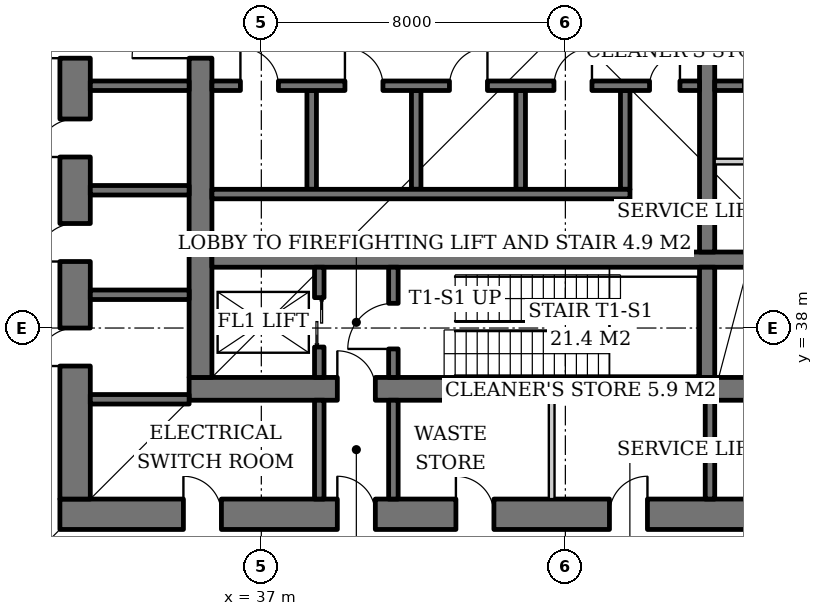
"""IFC4 building model, lengths in metres.
Left out: names, types, materials, properties, quantities, classifications, styles, units other than length and angle.
Written with IfcOpenShell. Run it as: python <this file> out.ifc"""

import sys

from ifc_helpers import new_model, si_unit, direction, frame, frame_2d, origin, place, context, subcontext, project, spatial, rectangle, extrude, element, fill, save


model = new_model("IFC4")
c1 = context("Model", 3, precision=1e-05, world=origin(), true_north=direction((0.0, 1.0)))
c2 = subcontext(c1, "Body", "Model", "MODEL_VIEW")
j1 = project(units=[si_unit("LENGTHUNIT", "METRE"), si_unit("PLANEANGLEUNIT", "RADIAN")], contexts=[c1])
p1 = place(None, origin())
s1 = spatial("IfcSite", under=j1, at=p1, CompositionType="ELEMENT")
p2 = place(p1, origin())
s2 = spatial("IfcBuilding", under=s1, at=p2, CompositionType="ELEMENT")
p3 = place(p2, frame((0.0, 0.0, -10.0)))
s3 = spatial("IfcBuildingStorey", under=s2, at=p3, CompositionType="ELEMENT", Elevation=-10.0)
p4 = place(p3, frame((35.1, 36.4, 0.0), z_axis=(0.0, 0.0, 1.0), x_axis=(1.0, 0.0, 0.0)))
e1 = element("IfcWall", 1, at=p4, inside=s3, PredefinedType="SHEAR", context=c2, shape_type="SweptSolid", body=[
    extrude(rectangle(XDim=19.8, YDim=0.6, at=frame_2d((9.9, 0.0))), origin(), (0.0, 0.0, 1.0), 5.0),
])
p5 = place(p4, frame((3.9, 0.0, 0.0)))
e2 = element("IfcOpeningElement", 2, at=p5, cuts=e1, PredefinedType="OPENING", context=c2, shape_type="SweptSolid", body=[
    extrude(rectangle(XDim=1.0, YDim=2.1, at=frame_2d((0.5, 1.05))), frame((0.0, 0.31, 0.0), z_axis=(0.0, -1.0, 0.0), x_axis=(1.0, 0.0, 0.0)), (0.0, 0.0, 1.0), 0.62),
])
p6 = place(p4, frame((15.35, 0.0, 0.0)))
e3 = element("IfcOpeningElement", 3, at=p6, cuts=e1, PredefinedType="OPENING", context=c2, shape_type="SweptSolid", body=[
    extrude(rectangle(XDim=1.0, YDim=2.1, at=frame_2d((0.5, 1.05))), frame((0.0, 0.31, 0.0), z_axis=(0.0, -1.0, 0.0), x_axis=(1.0, 0.0, 0.0)), (0.0, 0.0, 1.0), 0.62),
])
p7 = place(p3, frame((35.4, 36.7, 0.0), z_axis=(0.0, 0.0, 1.0), x_axis=(0.0, 1.0, 0.0)))
e4 = element("IfcWall", 4, at=p7, inside=s3, PredefinedType="SHEAR", context=c2, shape_type="SweptSolid", body=[
    extrude(rectangle(XDim=18.6, YDim=0.6, at=frame_2d((9.3, 0.0))), origin(), (0.0, 0.0, 1.0), 5.0),
])
p8 = place(p7, frame((8.4, 0.0, 0.0)))
e5 = element("IfcOpeningElement", 5, at=p8, cuts=e4, PredefinedType="OPENING", context=c2, shape_type="SweptSolid", body=[
    extrude(rectangle(XDim=1.8, YDim=2.4, at=frame_2d((0.9, 1.2))), frame((0.0, 0.31, 0.0), z_axis=(0.0, -1.0, 0.0), x_axis=(1.0, 0.0, 0.0)), (0.0, 0.0, 1.0), 0.62),
])
p9 = place(p3, frame((31.7, 33.1, 0.0), z_axis=(0.0, 0.0, 1.0), x_axis=(1.0, 0.0, 0.0)))
e6 = element("IfcWall", 6, at=p9, inside=s3, PredefinedType="SHEAR", context=c2, shape_type="SweptSolid", body=[
    extrude(rectangle(XDim=26.6, YDim=0.8, at=frame_2d((13.3, 0.0))), origin(), (0.0, 0.0, 1.0), 5.0),
])
p10 = place(p9, frame((7.3, 0.0, 0.0)))
e7 = element("IfcOpeningElement", 7, at=p10, cuts=e6, PredefinedType="OPENING", context=c2, shape_type="SweptSolid", body=[
    extrude(rectangle(XDim=1.0, YDim=2.1, at=frame_2d((0.5, 1.05))), frame((0.0, 0.41, 0.0), z_axis=(0.0, -1.0, 0.0), x_axis=(1.0, 0.0, 0.0)), (0.0, 0.0, 1.0), 0.82),
])
p11 = place(p9, frame((18.75, 0.0, 0.0)))
e8 = element("IfcOpeningElement", 8, at=p11, cuts=e6, PredefinedType="OPENING", context=c2, shape_type="SweptSolid", body=[
    extrude(rectangle(XDim=1.0, YDim=2.1, at=frame_2d((0.5, 1.05))), frame((0.0, 0.41, 0.0), z_axis=(0.0, -1.0, 0.0), x_axis=(1.0, 0.0, 0.0)), (0.0, 0.0, 1.0), 0.82),
])
p12 = place(p9, frame((3.25, 0.0, 0.0)))
e9 = element("IfcOpeningElement", 9, at=p12, cuts=e6, PredefinedType="OPENING", context=c2, shape_type="SweptSolid", body=[
    extrude(rectangle(XDim=1.0, YDim=2.1, at=frame_2d((0.5, 1.05))), frame((0.0, 0.41, 0.0), z_axis=(0.0, -1.0, 0.0), x_axis=(1.0, 0.0, 0.0)), (0.0, 0.0, 1.0), 0.82),
])
p13 = place(p9, frame((10.42, 0.0, 0.0)))
e10 = element("IfcOpeningElement", 10, at=p13, cuts=e6, PredefinedType="OPENING", context=c2, shape_type="SweptSolid", body=[
    extrude(rectangle(XDim=1.0, YDim=2.1, at=frame_2d((0.5, 1.05))), frame((0.0, 0.41, 0.0), z_axis=(0.0, -1.0, 0.0), x_axis=(1.0, 0.0, 0.0)), (0.0, 0.0, 1.0), 0.82),
])
p14 = place(p9, frame((14.46, 0.0, 0.0)))
e11 = element("IfcOpeningElement", 11, at=p14, cuts=e6, PredefinedType="OPENING", context=c2, shape_type="SweptSolid", body=[
    extrude(rectangle(XDim=1.0, YDim=2.1, at=frame_2d((0.5, 1.05))), frame((0.0, 0.41, 0.0), z_axis=(0.0, -1.0, 0.0), x_axis=(1.0, 0.0, 0.0)), (0.0, 0.0, 1.0), 0.82),
])
p15 = place(p9, frame((22.45, 0.0, 0.0)))
e12 = element("IfcOpeningElement", 12, at=p15, cuts=e6, PredefinedType="OPENING", context=c2, shape_type="SweptSolid", body=[
    extrude(rectangle(XDim=1.0, YDim=2.1, at=frame_2d((0.5, 1.05))), frame((0.0, 0.41, 0.0), z_axis=(0.0, -1.0, 0.0), x_axis=(1.0, 0.0, 0.0)), (0.0, 0.0, 1.0), 0.82),
])
p16 = place(p3, frame((32.1, 33.5, 0.0), z_axis=(0.0, 0.0, 1.0), x_axis=(0.0, 1.0, 0.0)))
e13 = element("IfcWall", 13, at=p16, inside=s3, PredefinedType="SHEAR", context=c2, shape_type="SweptSolid", body=[
    extrude(rectangle(XDim=25.0, YDim=0.8, at=frame_2d((12.5, 0.0))), origin(), (0.0, 0.0, 1.0), 5.0),
])
p17 = place(p16, frame((11.6, 0.0, 0.0)))
e14 = element("IfcOpeningElement", 14, at=p17, cuts=e13, PredefinedType="OPENING", context=c2, shape_type="SweptSolid", body=[
    extrude(rectangle(XDim=1.8, YDim=2.4, at=frame_2d((0.9, 1.2))), frame((0.0, 0.41, 0.0), z_axis=(0.0, -1.0, 0.0), x_axis=(1.0, 0.0, 0.0)), (0.0, 0.0, 1.0), 0.82),
])
p18 = place(p16, frame((3.5, 0.0, 0.0)))
e15 = element("IfcOpeningElement", 15, at=p18, cuts=e13, PredefinedType="OPENING", context=c2, shape_type="SweptSolid", body=[
    extrude(rectangle(XDim=1.0, YDim=2.1, at=frame_2d((0.5, 1.05))), frame((0.0, 0.41, 0.0), z_axis=(0.0, -1.0, 0.0), x_axis=(1.0, 0.0, 0.0)), (0.0, 0.0, 1.0), 0.82),
])
p19 = place(p16, frame((6.25, 0.0, 0.0)))
e16 = element("IfcOpeningElement", 16, at=p19, cuts=e13, PredefinedType="OPENING", context=c2, shape_type="SweptSolid", body=[
    extrude(rectangle(XDim=1.0, YDim=2.1, at=frame_2d((0.5, 1.05))), frame((0.0, 0.41, 0.0), z_axis=(0.0, -1.0, 0.0), x_axis=(1.0, 0.0, 0.0)), (0.0, 0.0, 1.0), 0.82),
])
p20 = place(p16, frame((9.0, 0.0, 0.0)))
e17 = element("IfcOpeningElement", 17, at=p20, cuts=e13, PredefinedType="OPENING", context=c2, shape_type="SweptSolid", body=[
    extrude(rectangle(XDim=1.0, YDim=2.1, at=frame_2d((0.5, 1.05))), frame((0.0, 0.41, 0.0), z_axis=(0.0, -1.0, 0.0), x_axis=(1.0, 0.0, 0.0)), (0.0, 0.0, 1.0), 0.82),
])
p21 = place(p16, frame((15.0, 0.0, 0.0)))
e18 = element("IfcOpeningElement", 18, at=p21, cuts=e13, PredefinedType="OPENING", context=c2, shape_type="SweptSolid", body=[
    extrude(rectangle(XDim=1.0, YDim=2.1, at=frame_2d((0.5, 1.05))), frame((0.0, 0.41, 0.0), z_axis=(0.0, -1.0, 0.0), x_axis=(1.0, 0.0, 0.0)), (0.0, 0.0, 1.0), 0.82),
])
p22 = place(p16, frame((17.75, 0.0, 0.0)))
e19 = element("IfcOpeningElement", 19, at=p22, cuts=e13, PredefinedType="OPENING", context=c2, shape_type="SweptSolid", body=[
    extrude(rectangle(XDim=1.0, YDim=2.1, at=frame_2d((0.5, 1.05))), frame((0.0, 0.41, 0.0), z_axis=(0.0, -1.0, 0.0), x_axis=(1.0, 0.0, 0.0)), (0.0, 0.0, 1.0), 0.82),
])
p23 = place(p3, frame((35.7, 39.8, 0.0), z_axis=(0.0, 0.0, 1.0), x_axis=(1.0, 0.0, 0.0)))
e20 = element("IfcWall", 20, at=p23, inside=s3, PredefinedType="SHEAR", context=c2, shape_type="SweptSolid", body=[
    extrude(rectangle(XDim=18.6, YDim=0.4, at=frame_2d((9.3, 0.0))), origin(), (0.0, 0.0, 1.0), 5.0),
])
p24 = place(p3, frame((48.73, 36.7, 0.0), z_axis=(0.0, 0.0, 1.0), x_axis=(0.0, 1.0, 0.0)))
e21 = element("IfcWall", 21, at=p24, inside=s3, PredefinedType="SHEAR", context=c2, shape_type="SweptSolid", body=[
    extrude(rectangle(XDim=2.9, YDim=0.4, at=frame_2d((1.45, 0.0))), origin(), (0.0, 0.0, 1.0), 5.0),
])
p25 = place(p3, frame((48.73, 40.0, 0.0), z_axis=(0.0, 0.0, 1.0), x_axis=(0.0, 1.0, 0.0)))
e22 = element("IfcWall", 22, at=p25, inside=s3, PredefinedType="SHEAR", context=c2, shape_type="SweptSolid", body=[
    extrude(rectangle(XDim=12.0, YDim=0.4, at=frame_2d((6.0, 0.0))), origin(), (0.0, 0.0, 1.0), 5.0),
])
p26 = place(p3, frame((38.525, 36.7, 0.0), z_axis=(0.0, 0.0, 1.0), x_axis=(0.0, 1.0, 0.0)))
e23 = element("IfcWall", 23, at=p26, inside=s3, PredefinedType="SHEAR", context=c2, shape_type="SweptSolid", body=[
    extrude(rectangle(XDim=2.9, YDim=0.25, at=frame_2d((1.45, 0.0))), origin(), (0.0, 0.0, 1.0), 5.0),
])
p27 = place(p26, frame((0.8, 0.0, 0.0)))
e24 = element("IfcOpeningElement", 24, at=p27, cuts=e23, PredefinedType="OPENING", context=c2, shape_type="SweptSolid", body=[
    extrude(rectangle(XDim=1.3, YDim=2.2, at=frame_2d((0.65, 1.1))), frame((0.0, 0.135, 0.0), z_axis=(0.0, -1.0, 0.0), x_axis=(1.0, 0.0, 0.0)), (0.0, 0.0, 1.0), 0.27),
])
p28 = place(p3, frame((40.475, 36.7, 0.0), z_axis=(0.0, 0.0, 1.0), x_axis=(0.0, 1.0, 0.0)))
e25 = element("IfcWall", 25, at=p28, inside=s3, PredefinedType="SHEAR", context=c2, shape_type="SweptSolid", body=[
    extrude(rectangle(XDim=2.9, YDim=0.25, at=frame_2d((1.45, 0.0))), origin(), (0.0, 0.0, 1.0), 5.0),
])
p29 = place(p28, frame((0.75, 0.0, 0.0)))
e26 = element("IfcOpeningElement", 26, at=p29, cuts=e25, PredefinedType="OPENING", context=c2, shape_type="SweptSolid", body=[
    extrude(rectangle(XDim=1.2, YDim=2.1, at=frame_2d((0.6, 1.05))), frame((0.0, 0.135, 0.0), z_axis=(0.0, -1.0, 0.0), x_axis=(1.0, 0.0, 0.0)), (0.0, 0.0, 1.0), 0.27),
])
for number, where, z_axis, x_axis in (
    (27, (38.325, 44.25, 0.0), (0.0, 0.0, 1.0), (0.0, -1.0, 0.0)),
    (28, (41.075, 44.25, 0.0), (0.0, 0.0, 1.0), (0.0, -1.0, 0.0)),
    (29, (43.825, 44.25, 0.0), (0.0, 0.0, 1.0), (0.0, -1.0, 0.0)),
    (30, (46.575, 44.25, 0.0), (0.0, 0.0, 1.0), (0.0, -1.0, 0.0)),
):
    element("IfcWall", number, at=place(p3, frame(where, z_axis=z_axis, x_axis=x_axis)), inside=s3, PredefinedType="SHEAR", context=c2, shape_type="SweptSolid", body=[
        extrude(rectangle(XDim=2.6, YDim=0.25, at=frame_2d((1.3, 0.0))), origin(), (0.0, 0.0, 1.0), 5.0),
    ])
p30 = place(p3, frame((35.7, 41.525, 0.0), z_axis=(0.0, 0.0, 1.0), x_axis=(1.0, 0.0, 0.0)))
e31 = element("IfcWall", 31, at=p30, inside=s3, PredefinedType="SHEAR", context=c2, shape_type="SweptSolid", body=[
    extrude(rectangle(XDim=11.0, YDim=0.25, at=frame_2d((5.5, 0.0))), origin(), (0.0, 0.0, 1.0), 5.0),
])
p31 = place(p3, frame((35.7, 44.375, 0.0), z_axis=(0.0, 0.0, 1.0), x_axis=(1.0, 0.0, 0.0)))
e32 = element("IfcWall", 32, at=p31, inside=s3, PredefinedType="SHEAR", context=c2, shape_type="SweptSolid", body=[
    extrude(rectangle(XDim=12.83, YDim=0.25, at=frame_2d((6.415, 0.0))), origin(), (0.0, 0.0, 1.0), 5.0),
])
p32 = place(p31, frame((0.75, 0.0, 0.0)))
e33 = element("IfcOpeningElement", 33, at=p32, cuts=e32, PredefinedType="OPENING", context=c2, shape_type="SweptSolid", body=[
    extrude(rectangle(XDim=1.0, YDim=2.1, at=frame_2d((0.5, 1.05))), frame((0.0, 0.135, 0.0), z_axis=(0.0, -1.0, 0.0), x_axis=(1.0, 0.0, 0.0)), (0.0, 0.0, 1.0), 0.27),
])
p33 = place(p31, frame((3.5, 0.0, 0.0)))
e34 = element("IfcOpeningElement", 34, at=p33, cuts=e32, PredefinedType="OPENING", context=c2, shape_type="SweptSolid", body=[
    extrude(rectangle(XDim=1.0, YDim=2.1, at=frame_2d((0.5, 1.05))), frame((0.0, 0.135, 0.0), z_axis=(0.0, -1.0, 0.0), x_axis=(1.0, 0.0, 0.0)), (0.0, 0.0, 1.0), 0.27),
])
p34 = place(p31, frame((6.25, 0.0, 0.0)))
e35 = element("IfcOpeningElement", 35, at=p34, cuts=e32, PredefinedType="OPENING", context=c2, shape_type="SweptSolid", body=[
    extrude(rectangle(XDim=1.0, YDim=2.1, at=frame_2d((0.5, 1.05))), frame((0.0, 0.135, 0.0), z_axis=(0.0, -1.0, 0.0), x_axis=(1.0, 0.0, 0.0)), (0.0, 0.0, 1.0), 0.27),
])
p35 = place(p31, frame((9.0, 0.0, 0.0)))
e36 = element("IfcOpeningElement", 36, at=p35, cuts=e32, PredefinedType="OPENING", context=c2, shape_type="SweptSolid", body=[
    extrude(rectangle(XDim=1.0, YDim=2.1, at=frame_2d((0.5, 1.05))), frame((0.0, 0.135, 0.0), z_axis=(0.0, -1.0, 0.0), x_axis=(1.0, 0.0, 0.0)), (0.0, 0.0, 1.0), 0.27),
])
p36 = place(p31, frame((11.515, 0.0, 0.0)))
e37 = element("IfcOpeningElement", 37, at=p36, cuts=e32, PredefinedType="OPENING", context=c2, shape_type="SweptSolid", body=[
    extrude(rectangle(XDim=0.8, YDim=2.0, at=frame_2d((0.4, 1.0))), frame((0.0, 0.135, 0.0), z_axis=(0.0, -1.0, 0.0), x_axis=(1.0, 0.0, 0.0)), (0.0, 0.0, 1.0), 0.27),
])
p37 = place(p3, frame((48.93, 44.375, 0.0), z_axis=(0.0, 0.0, 1.0), x_axis=(1.0, 0.0, 0.0)))
e38 = element("IfcWall", 38, at=p37, inside=s3, PredefinedType="SHEAR", context=c2, shape_type="SweptSolid", body=[
    extrude(rectangle(XDim=5.37, YDim=0.25, at=frame_2d((2.685, 0.0))), origin(), (0.0, 0.0, 1.0), 5.0),
])
p38 = place(p37, frame((0.78, 0.0, 0.0)))
e39 = element("IfcOpeningElement", 39, at=p38, cuts=e38, PredefinedType="OPENING", context=c2, shape_type="SweptSolid", body=[
    extrude(rectangle(XDim=1.0, YDim=2.1, at=frame_2d((0.5, 1.05))), frame((0.0, 0.135, 0.0), z_axis=(0.0, -1.0, 0.0), x_axis=(1.0, 0.0, 0.0)), (0.0, 0.0, 1.0), 0.27),
])
p39 = place(p37, frame((3.59, 0.0, 0.0)))
e40 = element("IfcOpeningElement", 40, at=p39, cuts=e38, PredefinedType="OPENING", context=c2, shape_type="SweptSolid", body=[
    extrude(rectangle(XDim=1.0, YDim=2.1, at=frame_2d((0.5, 1.05))), frame((0.0, 0.135, 0.0), z_axis=(0.0, -1.0, 0.0), x_axis=(1.0, 0.0, 0.0)), (0.0, 0.0, 1.0), 0.27),
])
for number, where, z_axis, x_axis in (
    (41, (32.5, 36.125, 0.0), (0.0, 0.0, 1.0), (1.0, 0.0, 0.0)),
    (42, (32.5, 38.875, 0.0), (0.0, 0.0, 1.0), (1.0, 0.0, 0.0)),
    (43, (32.5, 41.625, 0.0), (0.0, 0.0, 1.0), (1.0, 0.0, 0.0)),
    (44, (32.5, 44.375, 0.0), (0.0, 0.0, 1.0), (1.0, 0.0, 0.0)),
):
    element("IfcWall", number, at=place(p3, frame(where, z_axis=z_axis, x_axis=x_axis)), inside=s3, PredefinedType="SHEAR", context=c2, shape_type="SweptSolid", body=[
        extrude(rectangle(XDim=2.6, YDim=0.25, at=frame_2d((1.3, 0.0))), origin(), (0.0, 0.0, 1.0), 5.0),
    ])
for number, where, z_axis, x_axis in (
    (45, (38.525, 33.5, 0.0), (0.0, 0.0, 1.0), (0.0, 1.0, 0.0)),
    (46, (40.475, 33.5, 0.0), (0.0, 0.0, 1.0), (0.0, 1.0, 0.0)),
    (47, (48.805, 33.5, 0.0), (0.0, 0.0, 1.0), (0.0, 1.0, 0.0)),
):
    element("IfcWall", number, at=place(p3, frame(where, z_axis=z_axis, x_axis=x_axis)), inside=s3, PredefinedType="SOLIDWALL", context=c2, shape_type="SweptSolid", body=[
        extrude(rectangle(XDim=2.6, YDim=0.25, at=frame_2d((1.3, 0.0))), origin(), (0.0, 0.0, 1.0), 4.7),
    ])
p40 = place(p3, frame((48.93, 42.38, 0.0), z_axis=(0.0, 0.0, 1.0), x_axis=(1.0, 0.0, 0.0)))
e48 = element("IfcWall", 48, at=p40, inside=s3, PredefinedType="SOLIDWALL", context=c2, shape_type="SweptSolid", body=[
    extrude(rectangle(XDim=2.56, YDim=0.15, at=frame_2d((1.28, 0.0))), origin(), (0.0, 0.0, 1.0), 4.7),
])
p41 = place(p40, frame((0.78, 0.0, 0.0)))
e49 = element("IfcOpeningElement", 49, at=p41, cuts=e48, PredefinedType="OPENING", context=c2, shape_type="SweptSolid", body=[
    extrude(rectangle(XDim=1.0, YDim=2.1, at=frame_2d((0.5, 1.05))), frame((0.0, 0.085, 0.0), z_axis=(0.0, -1.0, 0.0), x_axis=(1.0, 0.0, 0.0)), (0.0, 0.0, 1.0), 0.17),
])
p42 = place(p3, frame((44.64, 33.5, 0.0), z_axis=(0.0, 0.0, 1.0), x_axis=(0.0, 1.0, 0.0)))
e50 = element("IfcWall", 50, at=p42, inside=s3, PredefinedType="SOLIDWALL", context=c2, shape_type="SweptSolid", body=[
    extrude(rectangle(XDim=2.6, YDim=0.15, at=frame_2d((1.3, 0.0))), origin(), (0.0, 0.0, 1.0), 4.7),
])
p43 = place(p27, origin())
e51 = element("IfcDoor", 51, at=p43, inside=s3, OperationType="DOUBLE_DOOR_SLIDING", PredefinedType="DOOR", context=c2, shape_type="SweptSolid", body=[
    extrude(rectangle(XDim=1.3, YDim=2.2, at=frame_2d((0.65, 1.1))), frame((0.0, 0.025, 0.0), z_axis=(0.0, -1.0, 0.0), x_axis=(1.0, 0.0, 0.0)), (0.0, 0.0, 1.0), 0.05),
])
fill(e24, e51)
p44 = place(p29, origin())
e52 = element("IfcDoor", 52, at=p44, inside=s3, OperationType="SINGLE_SWING_LEFT", PredefinedType="DOOR", context=c2, shape_type="SweptSolid", body=[
    extrude(rectangle(XDim=1.2, YDim=2.1, at=frame_2d((0.6, 1.05))), frame((0.0, 0.025, 0.0), z_axis=(0.0, -1.0, 0.0), x_axis=(1.0, 0.0, 0.0)), (0.0, 0.0, 1.0), 0.05),
])
fill(e26, e52)
p45 = place(p32, origin())
e53 = element("IfcDoor", 53, at=p45, inside=s3, OperationType="SINGLE_SWING_LEFT", PredefinedType="DOOR", context=c2, shape_type="SweptSolid", body=[
    extrude(rectangle(XDim=1.0, YDim=2.1, at=frame_2d((0.5, 1.05))), frame((0.0, 0.025, 0.0), z_axis=(0.0, -1.0, 0.0), x_axis=(1.0, 0.0, 0.0)), (0.0, 0.0, 1.0), 0.05),
])
fill(e33, e53)
p46 = place(p33, origin())
e54 = element("IfcDoor", 54, at=p46, inside=s3, OperationType="SINGLE_SWING_LEFT", PredefinedType="DOOR", context=c2, shape_type="SweptSolid", body=[
    extrude(rectangle(XDim=1.0, YDim=2.1, at=frame_2d((0.5, 1.05))), frame((0.0, 0.025, 0.0), z_axis=(0.0, -1.0, 0.0), x_axis=(1.0, 0.0, 0.0)), (0.0, 0.0, 1.0), 0.05),
])
fill(e34, e54)
p47 = place(p34, origin())
e55 = element("IfcDoor", 55, at=p47, inside=s3, OperationType="SINGLE_SWING_RIGHT", PredefinedType="DOOR", context=c2, shape_type="SweptSolid", body=[
    extrude(rectangle(XDim=1.0, YDim=2.1, at=frame_2d((0.5, 1.05))), frame((0.0, 0.025, 0.0), z_axis=(0.0, -1.0, 0.0), x_axis=(1.0, 0.0, 0.0)), (0.0, 0.0, 1.0), 0.05),
])
fill(e35, e55)
p48 = place(p35, origin())
e56 = element("IfcDoor", 56, at=p48, inside=s3, OperationType="SINGLE_SWING_RIGHT", PredefinedType="DOOR", context=c2, shape_type="SweptSolid", body=[
    extrude(rectangle(XDim=1.0, YDim=2.1, at=frame_2d((0.5, 1.05))), frame((0.0, 0.025, 0.0), z_axis=(0.0, -1.0, 0.0), x_axis=(1.0, 0.0, 0.0)), (0.0, 0.0, 1.0), 0.05),
])
fill(e36, e56)
p49 = place(p36, origin())
e57 = element("IfcDoor", 57, at=p49, inside=s3, OperationType="SINGLE_SWING_RIGHT", PredefinedType="DOOR", context=c2, shape_type="SweptSolid", body=[
    extrude(rectangle(XDim=0.8, YDim=2.0, at=frame_2d((0.4, 1.0))), frame((0.0, 0.025, 0.0), z_axis=(0.0, -1.0, 0.0), x_axis=(1.0, 0.0, 0.0)), (0.0, 0.0, 1.0), 0.05),
])
fill(e37, e57)
p50 = place(p5, origin())
e58 = element("IfcDoor", 58, at=p50, inside=s3, OperationType="SINGLE_SWING_LEFT", PredefinedType="DOOR", context=c2, shape_type="SweptSolid", body=[
    extrude(rectangle(XDim=1.0, YDim=2.1, at=frame_2d((0.5, 1.05))), frame((0.0, 0.025, 0.0), z_axis=(0.0, -1.0, 0.0), x_axis=(1.0, 0.0, 0.0)), (0.0, 0.0, 1.0), 0.05),
])
fill(e2, e58)
p51 = place(p8, origin())
e59 = element("IfcDoor", 59, at=p51, inside=s3, OperationType="DOUBLE_DOOR_SINGLE_SWING", PredefinedType="DOOR", context=c2, shape_type="SweptSolid", body=[
    extrude(rectangle(XDim=1.8, YDim=2.4, at=frame_2d((0.9, 1.2))), frame((0.0, 0.025, 0.0), z_axis=(0.0, -1.0, 0.0), x_axis=(1.0, 0.0, 0.0)), (0.0, 0.0, 1.0), 0.05),
])
fill(e5, e59)
p52 = place(p17, origin())
e60 = element("IfcDoor", 60, at=p52, inside=s3, OperationType="DOUBLE_DOOR_SINGLE_SWING", PredefinedType="DOOR", context=c2, shape_type="SweptSolid", body=[
    extrude(rectangle(XDim=1.8, YDim=2.4, at=frame_2d((0.9, 1.2))), frame((0.0, 0.025, 0.0), z_axis=(0.0, -1.0, 0.0), x_axis=(1.0, 0.0, 0.0)), (0.0, 0.0, 1.0), 0.05),
])
fill(e14, e60)
p53 = place(p10, origin())
e61 = element("IfcDoor", 61, at=p53, inside=s3, OperationType="SINGLE_SWING_LEFT", PredefinedType="DOOR", context=c2, shape_type="SweptSolid", body=[
    extrude(rectangle(XDim=1.0, YDim=2.1, at=frame_2d((0.5, 1.05))), frame((0.0, 0.025, 0.0), z_axis=(0.0, -1.0, 0.0), x_axis=(1.0, 0.0, 0.0)), (0.0, 0.0, 1.0), 0.05),
])
fill(e7, e61)
p54 = place(p18, origin())
e62 = element("IfcDoor", 62, at=p54, inside=s3, OperationType="SINGLE_SWING_LEFT", PredefinedType="DOOR", context=c2, shape_type="SweptSolid", body=[
    extrude(rectangle(XDim=1.0, YDim=2.1, at=frame_2d((0.5, 1.05))), frame((0.0, -0.34, 0.0), z_axis=(0.0, -1.0, 0.0), x_axis=(1.0, 0.0, 0.0)), (0.0, 0.0, 1.0), 0.05),
])
fill(e15, e62)
p55 = place(p19, origin())
e63 = element("IfcDoor", 63, at=p55, inside=s3, OperationType="SINGLE_SWING_LEFT", PredefinedType="DOOR", context=c2, shape_type="SweptSolid", body=[
    extrude(rectangle(XDim=1.0, YDim=2.1, at=frame_2d((0.5, 1.05))), frame((0.0, -0.34, 0.0), z_axis=(0.0, -1.0, 0.0), x_axis=(1.0, 0.0, 0.0)), (0.0, 0.0, 1.0), 0.05),
])
fill(e16, e63)
p56 = place(p20, origin())
e64 = element("IfcDoor", 64, at=p56, inside=s3, OperationType="SINGLE_SWING_LEFT", PredefinedType="DOOR", context=c2, shape_type="SweptSolid", body=[
    extrude(rectangle(XDim=1.0, YDim=2.1, at=frame_2d((0.5, 1.05))), frame((0.0, -0.34, 0.0), z_axis=(0.0, -1.0, 0.0), x_axis=(1.0, 0.0, 0.0)), (0.0, 0.0, 1.0), 0.05),
])
fill(e17, e64)
p57 = place(p12, origin())
e65 = element("IfcDoor", 65, at=p57, inside=s3, OperationType="SINGLE_SWING_LEFT", PredefinedType="DOOR", context=c2, shape_type="SweptSolid", body=[
    extrude(rectangle(XDim=1.0, YDim=2.1, at=frame_2d((0.5, 1.05))), frame((0.0, 0.39, 0.0), z_axis=(0.0, -1.0, 0.0), x_axis=(1.0, 0.0, 0.0)), (0.0, 0.0, 1.0), 0.05),
])
fill(e9, e65)
p58 = place(p13, origin())
e66 = element("IfcDoor", 66, at=p58, inside=s3, OperationType="SINGLE_SWING_LEFT", PredefinedType="DOOR", context=c2, shape_type="SweptSolid", body=[
    extrude(rectangle(XDim=1.0, YDim=2.1, at=frame_2d((0.5, 1.05))), frame((0.0, 0.39, 0.0), z_axis=(0.0, -1.0, 0.0), x_axis=(1.0, 0.0, 0.0)), (0.0, 0.0, 1.0), 0.05),
])
fill(e10, e66)
p59 = place(p14, origin())
e67 = element("IfcDoor", 67, at=p59, inside=s3, OperationType="SINGLE_SWING_RIGHT", PredefinedType="DOOR", context=c2, shape_type="SweptSolid", body=[
    extrude(rectangle(XDim=1.0, YDim=2.1, at=frame_2d((0.5, 1.05))), frame((0.0, 0.39, 0.0), z_axis=(0.0, -1.0, 0.0), x_axis=(1.0, 0.0, 0.0)), (0.0, 0.0, 1.0), 0.05),
])
fill(e11, e67)
save(model, sys.argv[1])
